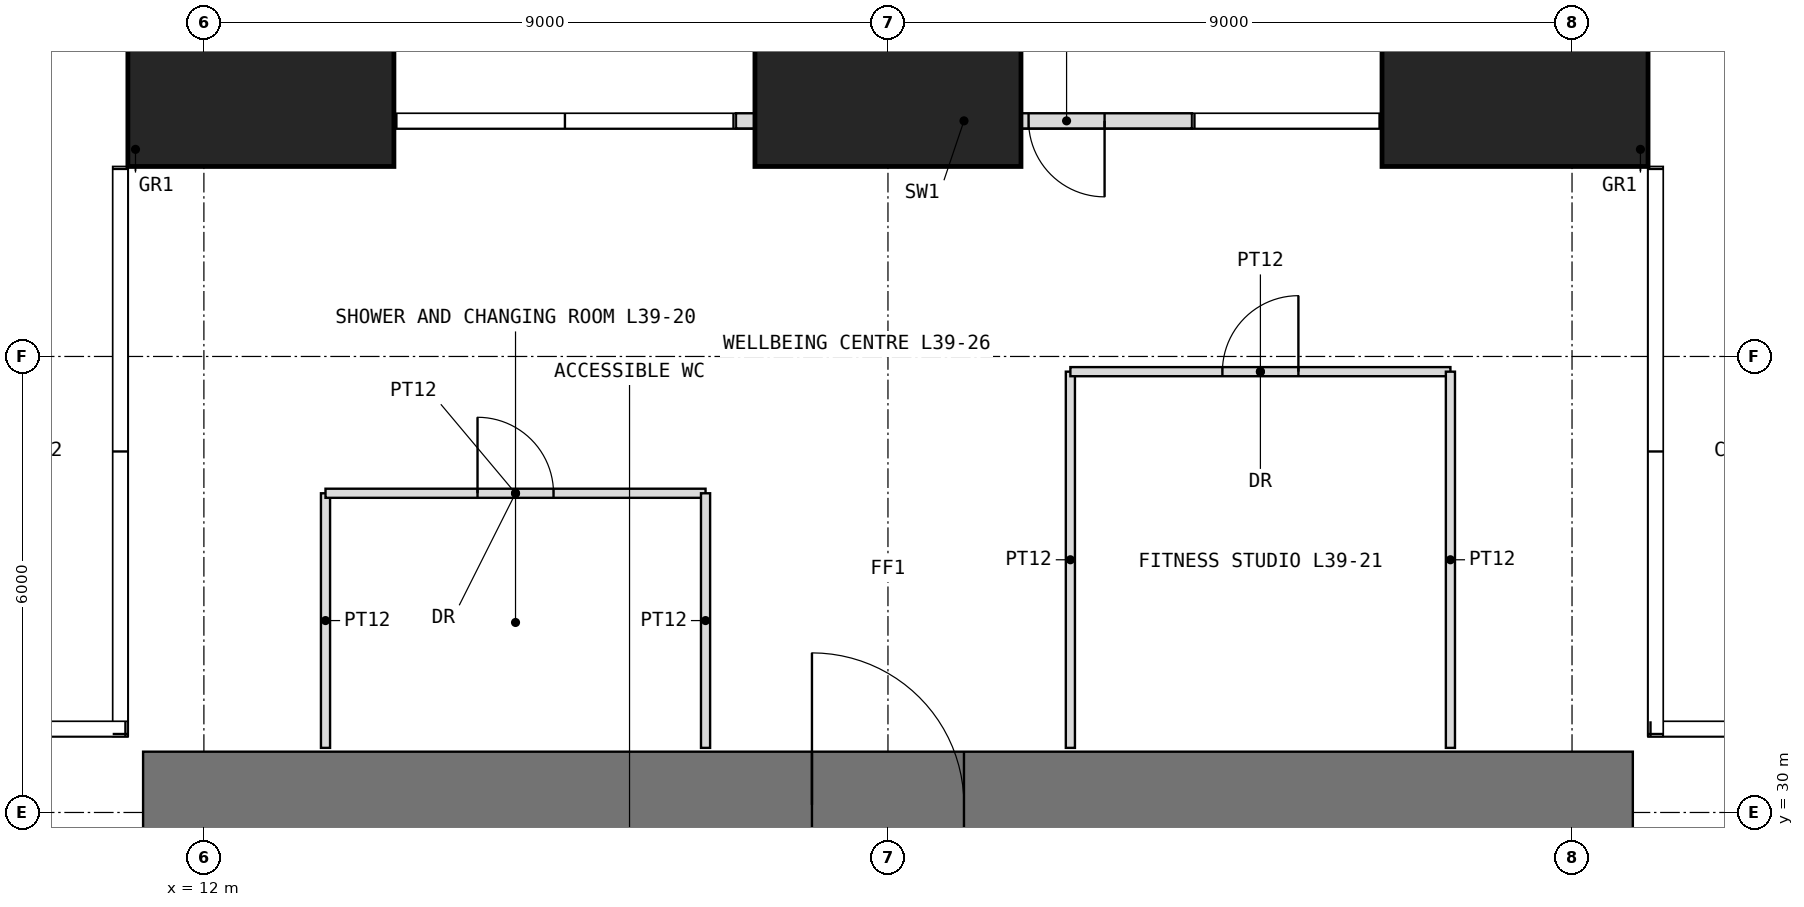
"""IFC4 building model, lengths in metres.
Left out: names, types, materials, properties, quantities, classifications, styles, units other than length and angle.
Written with IfcOpenShell. Run it as: python <this file> out.ifc"""

import sys

from ifc_helpers import new_model, si_unit, direction, frame, frame_2d, origin, origin_2d, place, context, subcontext, project, spatial, rectangle, extrude, element, fill, save


model = new_model("IFC4")
c1 = context("Model", 3, precision=1e-05, world=origin(), true_north=direction((0.0, 1.0)))
c2 = subcontext(c1, "Body", "Model", "MODEL_VIEW")
j1 = project(units=[si_unit("LENGTHUNIT", "METRE"), si_unit("PLANEANGLEUNIT", "RADIAN")], contexts=[c1])
p1 = place(None, origin())
s1 = spatial("IfcSite", under=j1, at=p1, CompositionType="ELEMENT")
p2 = place(p1, origin())
s2 = spatial("IfcBuilding", under=s1, at=p2, CompositionType="ELEMENT")
p3 = place(p2, frame((0.0, 0.0, 165.5)))
s3 = spatial("IfcBuildingStorey", under=s2, at=p3, CompositionType="ELEMENT", Elevation=165.5)
for number, where, z_axis, x_axis in (
    (1, (12.75, 40.25, 0.0), (0.0, 0.0, 1.0), (1.0, 0.0, 0.0)),
    (2, (21.0, 40.25, 0.0), (0.0, 0.0, 1.0), (1.0, 0.0, 0.0)),
    (3, (29.25, 40.25, 0.0), (0.0, 0.0, 1.0), (1.0, 0.0, 0.0)),
):
    element("IfcColumn", number, at=place(p3, frame(where, z_axis=z_axis, x_axis=x_axis)), inside=s3, PredefinedType="COLUMN", context=c2, shape_type="SweptSolid", body=[
        extrude(rectangle(XDim=3.5, YDim=3.5, at=origin_2d()), origin(), (0.0, 0.0, 1.0), 5.0),
    ])
p4 = place(p3, frame((25.0, 39.1, 0.0), z_axis=(0.0, 0.0, 1.0), x_axis=(-1.0, 0.0, 0.0)))
e4 = element("IfcWall", 4, at=p4, inside=s3, PredefinedType="USERDEFINED", context=c2, shape_type="SweptSolid", body=[
    extrude(rectangle(XDim=6.0, YDim=0.2, at=frame_2d((3.0, 0.0))), origin(), (0.0, 0.0, 1.0), 4.75),
])
p5 = place(p4, frame((1.15, 0.0, 0.0)))
e5 = element("IfcOpeningElement", 5, at=p5, cuts=e4, PredefinedType="OPENING", context=c2, shape_type="SweptSolid", body=[
    extrude(rectangle(XDim=1.0, YDim=2.4, at=frame_2d((0.5, 1.2))), frame((0.0, 0.11, 0.0), z_axis=(0.0, -1.0, 0.0), x_axis=(1.0, 0.0, 0.0)), (0.0, 0.0, 1.0), 0.22),
])
p6 = place(p3, frame((11.2, 30.1, -0.05), z_axis=(0.0, 0.0, 1.0), x_axis=(1.0, 0.0, 0.0)))
e6 = element("IfcWall", 6, at=p6, inside=s3, PredefinedType="SHEAR", context=c2, shape_type="SweptSolid", body=[
    extrude(rectangle(XDim=19.6, YDim=1.4, at=frame_2d((9.8, 0.0))), origin(), (0.0, 0.0, 1.0), 5.0),
])
p7 = place(p6, frame((8.8, 0.0, 0.05)))
e7 = element("IfcOpeningElement", 7, at=p7, cuts=e6, PredefinedType="OPENING", context=c2, shape_type="SweptSolid", body=[
    extrude(rectangle(XDim=2.0, YDim=2.2, at=frame_2d((1.0, 1.1))), frame((0.0, 0.71, 0.0), z_axis=(0.0, -1.0, 0.0), x_axis=(1.0, 0.0, 0.0)), (0.0, 0.0, 1.0), 1.42),
])
p8 = place(p3, frame((13.6, 30.85, 0.0), z_axis=(0.0, 0.0, 1.0), x_axis=(0.0, 1.0, 0.0)))
e8 = element("IfcWall", 8, at=p8, inside=s3, PredefinedType="PARTITIONING", context=c2, shape_type="SweptSolid", body=[
    extrude(rectangle(XDim=3.35, YDim=0.12, at=frame_2d((1.675, 0.0))), origin(), (0.0, 0.0, 1.0), 4.75),
])
p9 = place(p3, frame((13.6, 34.2, 0.0), z_axis=(0.0, 0.0, 1.0), x_axis=(1.0, 0.0, 0.0)))
e9 = element("IfcWall", 9, at=p9, inside=s3, PredefinedType="PARTITIONING", context=c2, shape_type="SweptSolid", body=[
    extrude(rectangle(XDim=5.0, YDim=0.12, at=frame_2d((2.5, 0.0))), origin(), (0.0, 0.0, 1.0), 4.75),
])
p10 = place(p9, frame((2.0, 0.0, 0.0)))
e10 = element("IfcOpeningElement", 10, at=p10, cuts=e9, PredefinedType="OPENING", context=c2, shape_type="SweptSolid", body=[
    extrude(rectangle(XDim=1.0, YDim=2.2, at=frame_2d((0.5, 1.1))), frame((0.0, 0.07, 0.0), z_axis=(0.0, -1.0, 0.0), x_axis=(1.0, 0.0, 0.0)), (0.0, 0.0, 1.0), 0.14),
])
p11 = place(p3, frame((18.6, 30.85, 0.0), z_axis=(0.0, 0.0, 1.0), x_axis=(0.0, 1.0, 0.0)))
e11 = element("IfcWall", 11, at=p11, inside=s3, PredefinedType="PARTITIONING", context=c2, shape_type="SweptSolid", body=[
    extrude(rectangle(XDim=3.35, YDim=0.12, at=frame_2d((1.675, 0.0))), origin(), (0.0, 0.0, 1.0), 4.75),
])
p12 = place(p3, frame((23.4, 30.85, 0.0), z_axis=(0.0, 0.0, 1.0), x_axis=(0.0, 1.0, 0.0)))
e12 = element("IfcWall", 12, at=p12, inside=s3, PredefinedType="PARTITIONING", context=c2, shape_type="SweptSolid", body=[
    extrude(rectangle(XDim=4.95, YDim=0.12, at=frame_2d((2.475, 0.0))), origin(), (0.0, 0.0, 1.0), 4.75),
])
p13 = place(p3, frame((23.4, 35.8, 0.0), z_axis=(0.0, 0.0, 1.0), x_axis=(1.0, 0.0, 0.0)))
e13 = element("IfcWall", 13, at=p13, inside=s3, PredefinedType="PARTITIONING", context=c2, shape_type="SweptSolid", body=[
    extrude(rectangle(XDim=5.0, YDim=0.12, at=frame_2d((2.5, 0.0))), origin(), (0.0, 0.0, 1.0), 4.75),
])
p14 = place(p13, frame((2.0, 0.0, 0.0)))
e14 = element("IfcOpeningElement", 14, at=p14, cuts=e13, PredefinedType="OPENING", context=c2, shape_type="SweptSolid", body=[
    extrude(rectangle(XDim=1.0, YDim=2.2, at=frame_2d((0.5, 1.1))), frame((0.0, 0.07, 0.0), z_axis=(0.0, -1.0, 0.0), x_axis=(1.0, 0.0, 0.0)), (0.0, 0.0, 1.0), 0.14),
])
p15 = place(p3, frame((28.4, 30.85, 0.0), z_axis=(0.0, 0.0, 1.0), x_axis=(0.0, 1.0, 0.0)))
e15 = element("IfcWall", 15, at=p15, inside=s3, PredefinedType="PARTITIONING", context=c2, shape_type="SweptSolid", body=[
    extrude(rectangle(XDim=4.95, YDim=0.12, at=frame_2d((2.475, 0.0))), origin(), (0.0, 0.0, 1.0), 4.75),
])
p16 = place(p5, origin())
e16 = element("IfcDoor", 16, at=p16, inside=s3, OperationType="SINGLE_SWING_LEFT", PredefinedType="DOOR", context=c2, shape_type="SweptSolid", body=[
    extrude(rectangle(XDim=1.0, YDim=2.4, at=frame_2d((0.5, 1.2))), frame((0.0, 0.025, 0.0), z_axis=(0.0, -1.0, 0.0), x_axis=(1.0, 0.0, 0.0)), (0.0, 0.0, 1.0), 0.05),
])
fill(e5, e16)
p17 = place(p7, origin())
e17 = element("IfcDoor", 17, at=p17, inside=s3, OperationType="DOUBLE_DOOR_SINGLE_SWING", PredefinedType="DOOR", context=c2, shape_type="SweptSolid", body=[
    extrude(rectangle(XDim=2.0, YDim=2.2, at=frame_2d((1.0, 1.1))), frame((0.0, 0.025, 0.0), z_axis=(0.0, -1.0, 0.0), x_axis=(1.0, 0.0, 0.0)), (0.0, 0.0, 1.0), 0.05),
])
fill(e7, e17)
p18 = place(p10, origin())
e18 = element("IfcDoor", 18, at=p18, inside=s3, OperationType="SINGLE_SWING_LEFT", PredefinedType="DOOR", context=c2, shape_type="SweptSolid", body=[
    extrude(rectangle(XDim=1.0, YDim=2.2, at=frame_2d((0.5, 1.1))), frame((0.0, 0.025, 0.0), z_axis=(0.0, -1.0, 0.0), x_axis=(1.0, 0.0, 0.0)), (0.0, 0.0, 1.0), 0.05),
])
fill(e10, e18)
p19 = place(p14, origin())
e19 = element("IfcDoor", 19, at=p19, inside=s3, OperationType="SINGLE_SWING_RIGHT", PredefinedType="DOOR", context=c2, shape_type="SweptSolid", body=[
    extrude(rectangle(XDim=1.0, YDim=2.2, at=frame_2d((0.5, 1.1))), frame((0.0, 0.025, 0.0), z_axis=(0.0, -1.0, 0.0), x_axis=(1.0, 0.0, 0.0)), (0.0, 0.0, 1.0), 0.05),
])
fill(e14, e19)
save(model, sys.argv[1])
